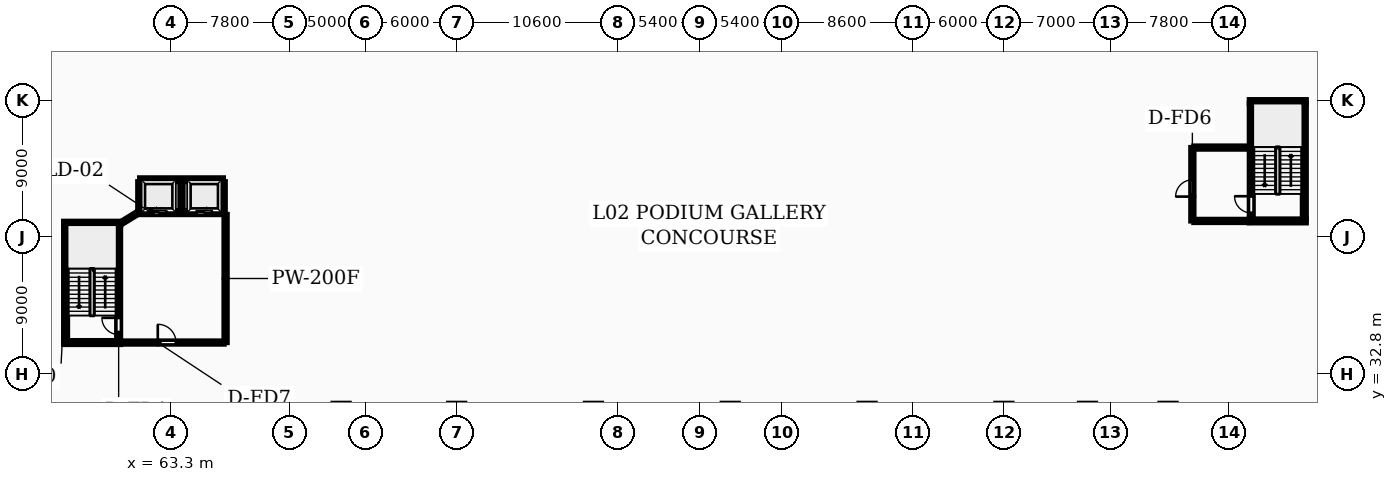
"""IFC4 building model, lengths in metres.
Left out: names, types, materials, properties, quantities, classifications, styles, units other than length and angle.
Written with IfcOpenShell. Run it as: python <this file> out.ifc"""

import sys

from ifc_helpers import new_model, si_unit, direction, frame, frame_2d, origin, place, context, subcontext, project, spatial, rectangle, extrude, element, fill, save


model = new_model("IFC4")
c1 = context("Model", 3, precision=1e-05, world=origin(), true_north=direction((0.0, 1.0)))
c2 = subcontext(c1, "Body", "Model", "MODEL_VIEW")
j1 = project(units=[si_unit("LENGTHUNIT", "METRE"), si_unit("PLANEANGLEUNIT", "RADIAN")], contexts=[c1])
p1 = place(None, origin())
s1 = spatial("IfcSite", under=j1, at=p1, CompositionType="ELEMENT")
p2 = place(p1, origin())
s2 = spatial("IfcBuilding", under=s1, at=p2, CompositionType="ELEMENT")
p3 = place(p2, frame((0.0, 0.0, 10.0)))
s3 = spatial("IfcBuildingStorey", under=s2, at=p3, CompositionType="ELEMENT", Elevation=10.0)
p4 = place(p3, frame((56.375, 35.0, 0.0), z_axis=(0.0, 0.0, 1.0), x_axis=(0.0, 1.0, 0.0)))
e1 = element("IfcWall", 1, at=p4, inside=s3, PredefinedType="SHEAR", context=c2, shape_type="SweptSolid", body=[
    extrude(rectangle(XDim=7.6, YDim=0.25, at=frame_2d((3.8, 0.0))), origin(), (0.0, 0.0, 1.0), 4.5),
])
for number, where, z_axis, x_axis in (
    (2, (56.25, 42.725, 0.0), (0.0, 0.0, 1.0), (1.0, 0.0, 0.0)),
    (3, (56.25, 34.875, 0.0), (0.0, 0.0, 1.0), (1.0, 0.0, 0.0)),
):
    element("IfcWall", number, at=place(p3, frame(where, z_axis=z_axis, x_axis=x_axis)), inside=s3, PredefinedType="SHEAR", context=c2, shape_type="SweptSolid", body=[
        extrude(rectangle(XDim=3.74, YDim=0.25, at=frame_2d((1.87, 0.0))), origin(), (0.0, 0.0, 1.0), 4.5),
    ])
p5 = place(p3, frame((59.865, 35.0, 0.0), z_axis=(0.0, 0.0, 1.0), x_axis=(0.0, 1.0, 0.0)))
e4 = element("IfcWall", 4, at=p5, inside=s3, PredefinedType="SHEAR", context=c2, shape_type="SweptSolid", body=[
    extrude(rectangle(XDim=7.6, YDim=0.25, at=frame_2d((3.8, 0.0))), origin(), (0.0, 0.0, 1.0), 4.5),
])
p6 = place(p5, frame((0.4, 0.0, 0.0)))
e5 = element("IfcOpeningElement", 5, at=p6, cuts=e4, PredefinedType="OPENING", context=c2, shape_type="SweptSolid", body=[
    extrude(rectangle(XDim=1.1, YDim=2.1, at=frame_2d((0.55, 1.05))), frame((0.0, 0.135, 0.0), z_axis=(0.0, -1.0, 0.0), x_axis=(1.0, 0.0, 0.0)), (0.0, 0.0, 1.0), 0.27),
])
p7 = place(p3, frame((61.25, 43.42, 0.0), z_axis=(0.0, 0.0, 1.0), x_axis=(1.0, 0.0, 0.0)))
e6 = element("IfcWall", 6, at=p7, inside=s3, PredefinedType="SHEAR", context=c2, shape_type="SweptSolid", body=[
    extrude(rectangle(XDim=5.5, YDim=0.25, at=frame_2d((2.75, 0.0))), origin(), (0.0, 0.0, 1.0), 4.5),
])
p8 = place(p7, frame((0.74, 0.0, 0.0)))
e7 = element("IfcOpeningElement", 7, at=p8, cuts=e6, PredefinedType="OPENING", context=c2, shape_type="SweptSolid", body=[
    extrude(rectangle(XDim=1.02, YDim=2.12, at=frame_2d((0.51, 1.06))), frame((0.0, 0.135, 0.0), z_axis=(0.0, -1.0, 0.0), x_axis=(1.0, 0.0, 0.0)), (0.0, 0.0, 1.0), 0.27),
])
p9 = place(p7, frame((3.74, 0.0, 0.0)))
e8 = element("IfcOpeningElement", 8, at=p9, cuts=e6, PredefinedType="OPENING", context=c2, shape_type="SweptSolid", body=[
    extrude(rectangle(XDim=1.02, YDim=2.12, at=frame_2d((0.51, 1.06))), frame((0.0, 0.135, 0.0), z_axis=(0.0, -1.0, 0.0), x_axis=(1.0, 0.0, 0.0)), (0.0, 0.0, 1.0), 0.27),
])
p10 = place(p3, frame((61.25, 45.58, 0.0), z_axis=(0.0, 0.0, 1.0), x_axis=(1.0, 0.0, 0.0)))
e9 = element("IfcWall", 9, at=p10, inside=s3, PredefinedType="SHEAR", context=c2, shape_type="SweptSolid", body=[
    extrude(rectangle(XDim=5.5, YDim=0.25, at=frame_2d((2.75, 0.0))), origin(), (0.0, 0.0, 1.0), 4.5),
])
for number, where, z_axis, x_axis in (
    (10, (61.25, 43.55, 0.0), (0.0, 0.0, 1.0), (0.0, 1.0, 0.0)),
    (11, (66.75, 43.55, 0.0), (0.0, 0.0, 1.0), (0.0, 1.0, 0.0)),
):
    element("IfcWall", number, at=place(p3, frame(where, z_axis=z_axis, x_axis=x_axis)), inside=s3, PredefinedType="SHEAR", context=c2, shape_type="SweptSolid", body=[
        extrude(rectangle(XDim=1.9, YDim=0.25, at=frame_2d((0.95, 0.0))), origin(), (0.0, 0.0, 1.0), 4.5),
    ])
p11 = place(p3, frame((64.0, 43.55, 0.0), z_axis=(0.0, 0.0, 1.0), x_axis=(0.0, 1.0, 0.0)))
e12 = element("IfcWall", 12, at=p11, inside=s3, PredefinedType="PARTITIONING", context=c2, shape_type="SweptSolid", body=[
    extrude(rectangle(XDim=1.9, YDim=0.2, at=frame_2d((0.95, 0.0))), origin(), (0.0, 0.0, 1.0), 4.2),
])
p12 = place(p3, frame((59.84, 34.875, 0.0), z_axis=(0.0, 0.0, 1.0), x_axis=(1.0, 0.0, 0.0)))
e13 = element("IfcWall", 13, at=p12, inside=s3, PredefinedType="PARTITIONING", context=c2, shape_type="SweptSolid", body=[
    extrude(rectangle(XDim=6.96, YDim=0.2, at=frame_2d((3.48, 0.0))), origin(), (0.0, 0.0, 1.0), 4.2),
])
p13 = place(p12, frame((2.6, 0.0, 0.0)))
e14 = element("IfcOpeningElement", 14, at=p13, cuts=e13, PredefinedType="OPENING", context=c2, shape_type="SweptSolid", body=[
    extrude(rectangle(XDim=1.2, YDim=2.18, at=frame_2d((0.6, 1.09))), frame((0.0, 0.11, 0.0), z_axis=(0.0, -1.0, 0.0), x_axis=(1.0, 0.0, 0.0)), (0.0, 0.0, 1.0), 0.22),
])
p14 = place(p3, frame((66.9, 34.875, 0.0), z_axis=(0.0, 0.0, 1.0), x_axis=(0.0, 1.0, 0.0)))
e15 = element("IfcWall", 15, at=p14, inside=s3, PredefinedType="PARTITIONING", context=c2, shape_type="SweptSolid", body=[
    extrude(rectangle(XDim=8.425, YDim=0.2, at=frame_2d((4.212, 0.0))), origin(), (0.0, 0.0, 1.0), 4.2),
])
p15 = place(p3, frame((60.02, 42.725, 0.0), z_axis=(0.0, 0.0, 1.0), x_axis=(0.851822584555, 0.523830396638, 0.0)))
e16 = element("IfcWall", 16, at=p15, inside=s3, PredefinedType="PARTITIONING", context=c2, shape_type="SweptSolid", body=[
    extrude(rectangle(XDim=1.326, YDim=0.2, at=frame_2d((0.663, 0.0))), origin(), (0.0, 0.0, 1.0), 4.2),
])
p16 = place(p3, frame((134.375, 43.0, 0.0), z_axis=(0.0, 0.0, 1.0), x_axis=(0.0, 1.0, 0.0)))
e17 = element("IfcWall", 17, at=p16, inside=s3, PredefinedType="SHEAR", context=c2, shape_type="SweptSolid", body=[
    extrude(rectangle(XDim=7.6, YDim=0.25, at=frame_2d((3.8, 0.0))), origin(), (0.0, 0.0, 1.0), 4.5),
])
p17 = place(p16, frame((0.4, 0.0, 0.0)))
e18 = element("IfcOpeningElement", 18, at=p17, cuts=e17, PredefinedType="OPENING", context=c2, shape_type="SweptSolid", body=[
    extrude(rectangle(XDim=1.1, YDim=2.1, at=frame_2d((0.55, 1.05))), frame((0.0, 0.135, 0.0), z_axis=(0.0, -1.0, 0.0), x_axis=(1.0, 0.0, 0.0)), (0.0, 0.0, 1.0), 0.27),
])
p18 = place(p3, frame((137.865, 43.0, 0.0), z_axis=(0.0, 0.0, 1.0), x_axis=(0.0, 1.0, 0.0)))
e19 = element("IfcWall", 19, at=p18, inside=s3, PredefinedType="SHEAR", context=c2, shape_type="SweptSolid", body=[
    extrude(rectangle(XDim=7.6, YDim=0.25, at=frame_2d((3.8, 0.0))), origin(), (0.0, 0.0, 1.0), 4.5),
])
for number, where, z_axis, x_axis in (
    (20, (134.25, 42.875, 0.0), (0.0, 0.0, 1.0), (1.0, 0.0, 0.0)),
    (21, (134.25, 50.725, 0.0), (0.0, 0.0, 1.0), (1.0, 0.0, 0.0)),
):
    element("IfcWall", number, at=place(p3, frame(where, z_axis=z_axis, x_axis=x_axis)), inside=s3, PredefinedType="SHEAR", context=c2, shape_type="SweptSolid", body=[
        extrude(rectangle(XDim=3.74, YDim=0.25, at=frame_2d((1.87, 0.0))), origin(), (0.0, 0.0, 1.0), 4.5),
    ])
p19 = place(p3, frame((130.5, 42.875, 0.0), z_axis=(0.0, 0.0, 1.0), x_axis=(0.0, 1.0, 0.0)))
e22 = element("IfcWall", 22, at=p19, inside=s3, PredefinedType="PARTITIONING", context=c2, shape_type="SweptSolid", body=[
    extrude(rectangle(XDim=4.825, YDim=0.2, at=frame_2d((2.413, 0.0))), origin(), (0.0, 0.0, 1.0), 4.2),
])
p20 = place(p19, frame((1.6, 0.0, 0.0)))
e23 = element("IfcOpeningElement", 23, at=p20, cuts=e22, PredefinedType="OPENING", context=c2, shape_type="SweptSolid", body=[
    extrude(rectangle(XDim=1.1, YDim=2.15, at=frame_2d((0.55, 1.075))), frame((0.0, 0.11, 0.0), z_axis=(0.0, -1.0, 0.0), x_axis=(1.0, 0.0, 0.0)), (0.0, 0.0, 1.0), 0.22),
])
for number, where, z_axis, x_axis in (
    (24, (130.6, 42.875, 0.0), (0.0, 0.0, 1.0), (1.0, 0.0, 0.0)),
    (25, (130.6, 47.7, 0.0), (0.0, 0.0, 1.0), (1.0, 0.0, 0.0)),
):
    element("IfcWall", number, at=place(p3, frame(where, z_axis=z_axis, x_axis=x_axis)), inside=s3, PredefinedType="PARTITIONING", context=c2, shape_type="SweptSolid", body=[
        extrude(rectangle(XDim=3.65, YDim=0.2, at=frame_2d((1.825, 0.0))), origin(), (0.0, 0.0, 1.0), 4.2),
    ])
p21 = place(p6, origin())
e26 = element("IfcDoor", 26, at=p21, inside=s3, OperationType="SINGLE_SWING_RIGHT", PredefinedType="DOOR", context=c2, shape_type="SweptSolid", body=[
    extrude(rectangle(XDim=1.1, YDim=2.1, at=frame_2d((0.55, 1.05))), frame((0.0, 0.025, 0.0), z_axis=(0.0, -1.0, 0.0), x_axis=(1.0, 0.0, 0.0)), (0.0, 0.0, 1.0), 0.05),
])
fill(e5, e26)
p22 = place(p8, origin())
e27 = element("IfcDoor", 27, at=p22, inside=s3, OperationType="SLIDING_TO_LEFT", PredefinedType="DOOR", context=c2, shape_type="SweptSolid", body=[
    extrude(rectangle(XDim=1.02, YDim=2.12, at=frame_2d((0.51, 1.06))), frame((0.0, 0.025, 0.0), z_axis=(0.0, -1.0, 0.0), x_axis=(1.0, 0.0, 0.0)), (0.0, 0.0, 1.0), 0.05),
])
fill(e7, e27)
p23 = place(p9, origin())
e28 = element("IfcDoor", 28, at=p23, inside=s3, OperationType="SLIDING_TO_RIGHT", PredefinedType="DOOR", context=c2, shape_type="SweptSolid", body=[
    extrude(rectangle(XDim=1.02, YDim=2.12, at=frame_2d((0.51, 1.06))), frame((0.0, 0.025, 0.0), z_axis=(0.0, -1.0, 0.0), x_axis=(1.0, 0.0, 0.0)), (0.0, 0.0, 1.0), 0.05),
])
fill(e8, e28)
p24 = place(p13, origin())
e29 = element("IfcDoor", 29, at=p24, inside=s3, OperationType="SINGLE_SWING_LEFT", PredefinedType="DOOR", context=c2, shape_type="SweptSolid", body=[
    extrude(rectangle(XDim=1.2, YDim=2.18, at=frame_2d((0.6, 1.09))), frame((0.0, 0.025, 0.0), z_axis=(0.0, -1.0, 0.0), x_axis=(1.0, 0.0, 0.0)), (0.0, 0.0, 1.0), 0.05),
])
fill(e14, e29)
p25 = place(p17, origin())
e30 = element("IfcDoor", 30, at=p25, inside=s3, OperationType="SINGLE_SWING_RIGHT", PredefinedType="DOOR", context=c2, shape_type="SweptSolid", body=[
    extrude(rectangle(XDim=1.1, YDim=2.1, at=frame_2d((0.55, 1.05))), frame((0.0, 0.025, 0.0), z_axis=(0.0, -1.0, 0.0), x_axis=(1.0, 0.0, 0.0)), (0.0, 0.0, 1.0), 0.05),
])
fill(e18, e30)
p26 = place(p20, origin())
e31 = element("IfcDoor", 31, at=p26, inside=s3, OperationType="SINGLE_SWING_LEFT", PredefinedType="DOOR", context=c2, shape_type="SweptSolid", body=[
    extrude(rectangle(XDim=1.1, YDim=2.15, at=frame_2d((0.55, 1.075))), frame((0.0, 0.025, 0.0), z_axis=(0.0, -1.0, 0.0), x_axis=(1.0, 0.0, 0.0)), (0.0, 0.0, 1.0), 0.05),
])
fill(e23, e31)
save(model, sys.argv[1])
